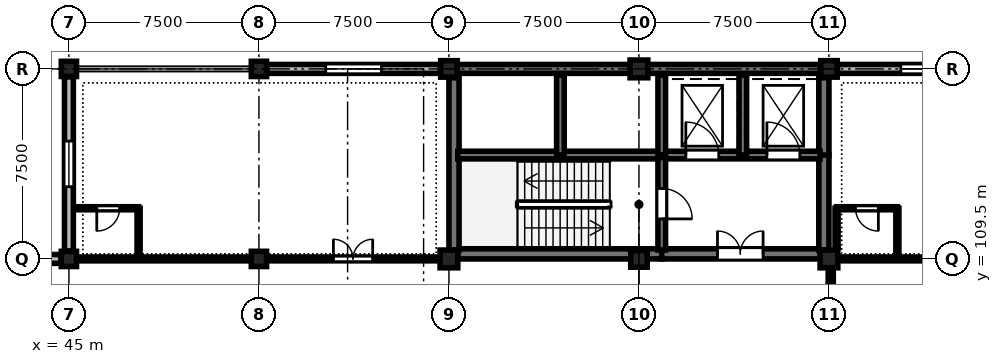
"""IFC4 building model, lengths in metres.
Left out: names, types, materials, properties, quantities, classifications, styles, units other than length and angle.
Written with IfcOpenShell. Run it as: python <this file> out.ifc"""

import sys

from ifc_helpers import new_model, si_unit, direction, frame, frame_2d, origin, origin_2d, place, context, subcontext, project, spatial, rectangle, circle, extrude, element, fill, save


model = new_model("IFC4")
c1 = context("Model", 3, precision=1e-05, world=origin(), true_north=direction((0.0, 1.0)))
c2 = subcontext(c1, "Body", "Model", "MODEL_VIEW")
j1 = project(units=[si_unit("LENGTHUNIT", "METRE"), si_unit("PLANEANGLEUNIT", "RADIAN")], contexts=[c1])
p1 = place(None, origin())
s1 = spatial("IfcSite", under=j1, at=p1, CompositionType="ELEMENT")
p2 = place(p1, origin())
s2 = spatial("IfcBuilding", under=s1, at=p2, CompositionType="ELEMENT")
p3 = place(p2, frame((0.0, 0.0, 9.3)))
s3 = spatial("IfcBuildingStorey", under=s2, at=p3, CompositionType="ELEMENT", Elevation=9.3)
p4 = place(p3, frame((45.0, 109.5, 0.0), z_axis=(0.0, 0.0, 1.0), x_axis=(1.0, 0.0, 0.0)))
e1 = element("IfcColumn", 1, at=p4, inside=s3, PredefinedType="COLUMN", context=c2, shape_type="SweptSolid", body=[
    extrude(rectangle(XDim=0.6, YDim=0.6, at=origin_2d()), origin(), (0.0, 0.0, 1.0), 4.8),
])
for number, where, z_axis, x_axis in (
    (2, (45.0, 117.0, 0.0), (0.0, 0.0, 1.0), (1.0, 0.0, 0.0)),
    (3, (52.5, 109.5, 0.0), (0.0, 0.0, 1.0), (1.0, 0.0, 0.0)),
):
    element("IfcColumn", number, at=place(p3, frame(where, z_axis=z_axis, x_axis=x_axis)), inside=s3, PredefinedType="COLUMN", context=c2, shape_type="SweptSolid", body=[
        extrude(circle(Radius=0.3, at=origin_2d()), origin(), (0.0, 0.0, 1.0), 4.8),
    ])
p5 = place(p3, frame((52.5, 117.0, 0.0), z_axis=(0.0, 0.0, 1.0), x_axis=(1.0, 0.0, 0.0)))
e4 = element("IfcColumn", 4, at=p5, inside=s3, PredefinedType="COLUMN", context=c2, shape_type="SweptSolid", body=[
    extrude(rectangle(XDim=0.6, YDim=0.6, at=origin_2d()), origin(), (0.0, 0.0, 1.0), 4.8),
])
p6 = place(p3, frame((60.0, 109.5, 0.0), z_axis=(0.0, 0.0, 1.0), x_axis=(1.0, 0.0, 0.0)))
e5 = element("IfcColumn", 5, at=p6, inside=s3, PredefinedType="COLUMN", context=c2, shape_type="SweptSolid", body=[
    extrude(rectangle(XDim=0.7, YDim=0.7, at=origin_2d()), origin(), (0.0, 0.0, 1.0), 4.8),
])
for number, where, z_axis, x_axis in (
    (6, (60.0, 117.0, 0.0), (0.0, 0.0, 1.0), (1.0, 0.0, 0.0)),
    (7, (67.5, 109.5, 0.0), (0.0, 0.0, 1.0), (1.0, 0.0, 0.0)),
):
    element("IfcColumn", number, at=place(p3, frame(where, z_axis=z_axis, x_axis=x_axis)), inside=s3, PredefinedType="COLUMN", context=c2, shape_type="SweptSolid", body=[
        extrude(rectangle(XDim=0.65, YDim=0.65, at=origin_2d()), origin(), (0.0, 0.0, 1.0), 4.8),
    ])
for number, where, z_axis, x_axis in (
    (8, (67.5, 117.0, 0.0), (0.0, 0.0, 1.0), (1.0, 0.0, 0.0)),
    (9, (75.0, 109.5, 0.0), (0.0, 0.0, 1.0), (1.0, 0.0, 0.0)),
):
    element("IfcColumn", number, at=place(p3, frame(where, z_axis=z_axis, x_axis=x_axis)), inside=s3, PredefinedType="COLUMN", context=c2, shape_type="SweptSolid", body=[
        extrude(rectangle(XDim=0.7, YDim=0.7, at=origin_2d()), origin(), (0.0, 0.0, 1.0), 4.8),
    ])
p7 = place(p3, frame((75.0, 117.0, 0.0), z_axis=(0.0, 0.0, 1.0), x_axis=(1.0, 0.0, 0.0)))
e10 = element("IfcColumn", 10, at=p7, inside=s3, PredefinedType="COLUMN", context=c2, shape_type="SweptSolid", body=[
    extrude(rectangle(XDim=0.65, YDim=0.65, at=origin_2d()), origin(), (0.0, 0.0, 1.0), 4.8),
])
p8 = place(p3, frame((37.81, 109.5, 0.0), z_axis=(0.0, 0.0, 1.0), x_axis=(1.0, 0.0, 0.0)))
e11 = element("IfcWall", 11, at=p8, inside=s3, PredefinedType="STANDARD", context=c2, shape_type="SweptSolid", body=[
    extrude(rectangle(XDim=6.88, YDim=0.35, at=frame_2d((3.44, 0.0))), origin(), (0.0, 0.0, 1.0), 3.95),
])
p9 = place(p8, frame((2.64, 0.0, 0.9)))
e12 = element("IfcOpeningElement", 12, at=p9, cuts=e11, PredefinedType="OPENING", context=c2, shape_type="SweptSolid", body=[
    extrude(rectangle(XDim=1.6, YDim=1.95, at=frame_2d((0.8, 0.975))), frame((0.0, 0.185, 0.0), z_axis=(0.0, -1.0, 0.0), x_axis=(1.0, 0.0, 0.0)), (0.0, 0.0, 1.0), 0.37),
])
p10 = place(p3, frame((45.0, 109.81, 0.0), z_axis=(0.0, 0.0, 1.0), x_axis=(0.0, 1.0, 0.0)))
e13 = element("IfcWall", 13, at=p10, inside=s3, PredefinedType="STANDARD", context=c2, shape_type="SweptSolid", body=[
    extrude(rectangle(XDim=6.88, YDim=0.35, at=frame_2d((3.44, 0.0))), origin(), (0.0, 0.0, 1.0), 3.95),
])
p11 = place(p10, frame((2.54, 0.0, 0.9)))
e14 = element("IfcOpeningElement", 14, at=p11, cuts=e13, PredefinedType="OPENING", context=c2, shape_type="SweptSolid", body=[
    extrude(rectangle(XDim=1.8, YDim=1.95, at=frame_2d((0.9, 0.975))), frame((0.0, 0.185, 0.0), z_axis=(0.0, -1.0, 0.0), x_axis=(1.0, 0.0, 0.0)), (0.0, 0.0, 1.0), 0.37),
])
p12 = place(p3, frame((52.81, 117.0, 0.0), z_axis=(0.0, 0.0, 1.0), x_axis=(1.0, 0.0, 0.0)))
e15 = element("IfcWall", 15, at=p12, inside=s3, PredefinedType="STANDARD", context=c2, shape_type="SweptSolid", body=[
    extrude(rectangle(XDim=6.855, YDim=0.35, at=frame_2d((3.427, 0.0))), origin(), (0.0, 0.0, 1.0), 3.95),
])
p13 = place(p12, frame((2.327, 0.0, 0.9)))
e16 = element("IfcOpeningElement", 16, at=p13, cuts=e15, PredefinedType="OPENING", context=c2, shape_type="SweptSolid", body=[
    extrude(rectangle(XDim=2.2, YDim=1.95, at=frame_2d((1.1, 0.975))), frame((0.0, 0.185, 0.0), z_axis=(0.0, -1.0, 0.0), x_axis=(1.0, 0.0, 0.0)), (0.0, 0.0, 1.0), 0.37),
])
for number, where, z_axis, x_axis in (
    (17, (60.335, 117.0, 0.0), (0.0, 0.0, 1.0), (1.0, 0.0, 0.0)),
    (18, (67.86, 117.0, 0.0), (0.0, 0.0, 1.0), (1.0, 0.0, 0.0)),
):
    element("IfcWall", number, at=place(p3, frame(where, z_axis=z_axis, x_axis=x_axis)), inside=s3, PredefinedType="SHEAR", context=c2, shape_type="SweptSolid", body=[
        extrude(rectangle(XDim=6.805, YDim=0.35, at=frame_2d((3.402, 0.0))), origin(), (0.0, 0.0, 1.0), 4.55),
    ])
p14 = place(p3, frame((75.335, 117.0, 0.0), z_axis=(0.0, 0.0, 1.0), x_axis=(1.0, 0.0, 0.0)))
e19 = element("IfcWall", 19, at=p14, inside=s3, PredefinedType="STANDARD", context=c2, shape_type="SweptSolid", body=[
    extrude(rectangle(XDim=6.805, YDim=0.35, at=frame_2d((3.402, 0.0))), origin(), (0.0, 0.0, 1.0), 3.95),
])
p15 = place(p14, frame((2.502, 0.0, 0.9)))
e20 = element("IfcOpeningElement", 20, at=p15, cuts=e19, PredefinedType="OPENING", context=c2, shape_type="SweptSolid", body=[
    extrude(rectangle(XDim=1.8, YDim=1.8, at=frame_2d((0.9, 0.9))), frame((0.0, 0.185, 0.0), z_axis=(0.0, -1.0, 0.0), x_axis=(1.0, 0.0, 0.0)), (0.0, 0.0, 1.0), 0.37),
])
p16 = place(p3, frame((60.35, 109.7, 0.0), z_axis=(0.0, 0.0, 1.0), x_axis=(1.0, 0.0, 0.0)))
e21 = element("IfcWall", 21, at=p16, inside=s3, PredefinedType="SHEAR", context=c2, shape_type="SweptSolid", body=[
    extrude(rectangle(XDim=8.05, YDim=0.4, at=frame_2d((4.025, 0.0))), origin(), (0.0, 0.0, 1.0), 4.55),
])
p17 = place(p3, frame((68.4, 109.7, 0.0), z_axis=(0.0, 0.0, 1.0), x_axis=(1.0, 0.0, 0.0)))
e22 = element("IfcWall", 22, at=p17, inside=s3, PredefinedType="SHEAR", context=c2, shape_type="SweptSolid", body=[
    extrude(rectangle(XDim=6.25, YDim=0.4, at=frame_2d((3.125, 0.0))), origin(), (0.0, 0.0, 1.0), 4.55),
])
p18 = place(p17, frame((2.2, 0.0, 0.0)))
e23 = element("IfcOpeningElement", 23, at=p18, cuts=e22, PredefinedType="OPENING", context=c2, shape_type="SweptSolid", body=[
    extrude(rectangle(XDim=1.8, YDim=2.25, at=frame_2d((0.9, 1.125))), frame((0.0, 0.21, 0.0), z_axis=(0.0, -1.0, 0.0), x_axis=(1.0, 0.0, 0.0)), (0.0, 0.0, 1.0), 0.42),
])
p19 = place(p3, frame((60.2, 109.85, 0.0), z_axis=(0.0, 0.0, 1.0), x_axis=(0.0, 1.0, 0.0)))
e24 = element("IfcWall", 24, at=p19, inside=s3, PredefinedType="SHEAR", context=c2, shape_type="SweptSolid", body=[
    extrude(rectangle(XDim=6.8, YDim=0.4, at=frame_2d((3.4, 0.0))), origin(), (0.0, 0.0, 1.0), 4.55),
])
p20 = place(p3, frame((74.8, 109.85, 0.0), z_axis=(0.0, 0.0, 1.0), x_axis=(0.0, 1.0, 0.0)))
e25 = element("IfcWall", 25, at=p20, inside=s3, PredefinedType="SHEAR", context=c2, shape_type="SweptSolid", body=[
    extrude(rectangle(XDim=3.75, YDim=0.4, at=frame_2d((1.875, 0.0))), origin(), (0.0, 0.0, 1.0), 4.55),
])
p21 = place(p3, frame((74.8, 113.6, 0.0), z_axis=(0.0, 0.0, 1.0), x_axis=(0.0, 1.0, 0.0)))
e26 = element("IfcWall", 26, at=p21, inside=s3, PredefinedType="SHEAR", context=c2, shape_type="SweptSolid", body=[
    extrude(rectangle(XDim=3.05, YDim=0.4, at=frame_2d((1.525, 0.0))), origin(), (0.0, 0.0, 1.0), 4.55),
])
p22 = place(p3, frame((60.35, 113.6, 0.0), z_axis=(0.0, 0.0, 1.0), x_axis=(1.0, 0.0, 0.0)))
e27 = element("IfcWall", 27, at=p22, inside=s3, PredefinedType="SHEAR", context=c2, shape_type="SweptSolid", body=[
    extrude(rectangle(XDim=8.05, YDim=0.3, at=frame_2d((4.025, 0.0))), origin(), (0.0, 0.0, 1.0), 4.55),
])
p23 = place(p3, frame((68.4, 113.6, 0.0), z_axis=(0.0, 0.0, 1.0), x_axis=(1.0, 0.0, 0.0)))
e28 = element("IfcWall", 28, at=p23, inside=s3, PredefinedType="SHEAR", context=c2, shape_type="SweptSolid", body=[
    extrude(rectangle(XDim=6.25, YDim=0.3, at=frame_2d((3.125, 0.0))), origin(), (0.0, 0.0, 1.0), 4.55),
])
p24 = place(p23, frame((0.95, 0.0, 0.0)))
e29 = element("IfcOpeningElement", 29, at=p24, cuts=e28, PredefinedType="OPENING", context=c2, shape_type="SweptSolid", body=[
    extrude(rectangle(XDim=1.3, YDim=2.2, at=frame_2d((0.65, 1.1))), frame((0.0, 0.16, 0.0), z_axis=(0.0, -1.0, 0.0), x_axis=(1.0, 0.0, 0.0)), (0.0, 0.0, 1.0), 0.32),
])
p25 = place(p23, frame((4.15, 0.0, 0.0)))
e30 = element("IfcOpeningElement", 30, at=p25, cuts=e28, PredefinedType="OPENING", context=c2, shape_type="SweptSolid", body=[
    extrude(rectangle(XDim=1.3, YDim=2.2, at=frame_2d((0.65, 1.1))), frame((0.0, 0.16, 0.0), z_axis=(0.0, -1.0, 0.0), x_axis=(1.0, 0.0, 0.0)), (0.0, 0.0, 1.0), 0.32),
])
p26 = place(p3, frame((68.4, 113.5, 0.0), z_axis=(0.0, 0.0, 1.0), x_axis=(0.0, -1.0, 0.0)))
e31 = element("IfcWall", 31, at=p26, inside=s3, PredefinedType="SHEAR", context=c2, shape_type="SweptSolid", body=[
    extrude(rectangle(XDim=3.65, YDim=0.3, at=frame_2d((1.825, 0.0))), origin(), (0.0, 0.0, 1.0), 4.55),
])
p27 = place(p26, frame((1.22, 0.0, 0.0)))
e32 = element("IfcOpeningElement", 32, at=p27, cuts=e31, PredefinedType="OPENING", context=c2, shape_type="SweptSolid", body=[
    extrude(rectangle(XDim=1.2, YDim=2.25, at=frame_2d((0.6, 1.125))), frame((0.0, 0.16, 0.0), z_axis=(0.0, -1.0, 0.0), x_axis=(1.0, 0.0, 0.0)), (0.0, 0.0, 1.0), 0.32),
])
for number, where, z_axis, x_axis in (
    (33, (64.4, 113.6, 0.0), (0.0, 0.0, 1.0), (0.0, 1.0, 0.0)),
    (34, (68.4, 113.6, 0.0), (0.0, 0.0, 1.0), (0.0, 1.0, 0.0)),
    (35, (71.6, 113.6, 0.0), (0.0, 0.0, 1.0), (0.0, 1.0, 0.0)),
):
    element("IfcWall", number, at=place(p3, frame(where, z_axis=z_axis, x_axis=x_axis)), inside=s3, PredefinedType="SHEAR", context=c2, shape_type="SweptSolid", body=[
        extrude(rectangle(XDim=3.15, YDim=0.3, at=frame_2d((1.575, 0.0))), origin(), (0.0, 0.0, 1.0), 4.55),
    ])
p28 = place(p3, frame((45.35, 109.5, 0.0), z_axis=(0.0, 0.0, 1.0), x_axis=(1.0, 0.0, 0.0)))
e36 = element("IfcWall", 36, at=p28, inside=s3, PredefinedType="PARTITIONING", context=c2, shape_type="SweptSolid", body=[
    extrude(rectangle(XDim=14.35, YDim=0.15, at=frame_2d((7.175, 0.0))), origin(), (0.0, 0.0, 1.0), 3.985),
])
p29 = place(p28, frame((10.09, 0.0, 0.0)))
e37 = element("IfcOpeningElement", 37, at=p29, cuts=e36, PredefinedType="OPENING", context=c2, shape_type="SweptSolid", body=[
    extrude(rectangle(XDim=1.55, YDim=2.35, at=frame_2d((0.775, 1.175))), frame((0.0, 0.085, 0.0), z_axis=(0.0, -1.0, 0.0), x_axis=(1.0, 0.0, 0.0)), (0.0, 0.0, 1.0), 0.17),
])
p30 = place(p3, frame((47.75, 111.5, 0.0), z_axis=(0.0, 0.0, 1.0), x_axis=(-1.0, 0.0, 0.0)))
e38 = element("IfcWall", 38, at=p30, inside=s3, PredefinedType="PARTITIONING", context=c2, shape_type="SweptSolid", body=[
    extrude(rectangle(XDim=2.4, YDim=0.12, at=frame_2d((1.2, 0.0))), origin(), (0.0, 0.0, 1.0), 4.535),
])
p31 = place(p30, frame((0.75, 0.0, 0.0)))
e39 = element("IfcOpeningElement", 39, at=p31, cuts=e38, PredefinedType="OPENING", context=c2, shape_type="SweptSolid", body=[
    extrude(rectangle(XDim=0.9, YDim=2.1, at=frame_2d((0.45, 1.05))), frame((0.0, 0.07, 0.0), z_axis=(0.0, -1.0, 0.0), x_axis=(1.0, 0.0, 0.0)), (0.0, 0.0, 1.0), 0.14),
])
p32 = place(p3, frame((47.75, 109.5, 0.0), z_axis=(0.0, 0.0, 1.0), x_axis=(0.0, 1.0, 0.0)))
e40 = element("IfcWall", 40, at=p32, inside=s3, PredefinedType="PARTITIONING", context=c2, shape_type="SweptSolid", body=[
    extrude(rectangle(XDim=2.0, YDim=0.12, at=frame_2d((1.0, 0.0))), origin(), (0.0, 0.0, 1.0), 4.535),
])
p33 = place(p3, frame((75.3, 109.5, 0.0), z_axis=(0.0, 0.0, 1.0), x_axis=(1.0, 0.0, 0.0)))
e41 = element("IfcWall", 41, at=p33, inside=s3, PredefinedType="PARTITIONING", context=c2, shape_type="SweptSolid", body=[
    extrude(rectangle(XDim=21.9, YDim=0.15, at=frame_2d((10.95, 0.0))), origin(), (0.0, 0.0, 1.0), 3.985),
])
p34 = place(p33, frame((10.175, 0.0, 0.0)))
e42 = element("IfcOpeningElement", 42, at=p34, cuts=e41, PredefinedType="OPENING", context=c2, shape_type="SweptSolid", body=[
    extrude(rectangle(XDim=1.55, YDim=2.35, at=frame_2d((0.775, 1.175))), frame((0.0, 0.085, 0.0), z_axis=(0.0, -1.0, 0.0), x_axis=(1.0, 0.0, 0.0)), (0.0, 0.0, 1.0), 0.17),
])
p35 = place(p3, frame((77.7, 111.5, 0.0), z_axis=(0.0, 0.0, 1.0), x_axis=(-1.0, 0.0, 0.0)))
e43 = element("IfcWall", 43, at=p35, inside=s3, PredefinedType="PARTITIONING", context=c2, shape_type="SweptSolid", body=[
    extrude(rectangle(XDim=2.4, YDim=0.12, at=frame_2d((1.2, 0.0))), origin(), (0.0, 0.0, 1.0), 4.535),
])
p36 = place(p35, frame((0.75, 0.0, 0.0)))
e44 = element("IfcOpeningElement", 44, at=p36, cuts=e43, PredefinedType="OPENING", context=c2, shape_type="SweptSolid", body=[
    extrude(rectangle(XDim=0.9, YDim=2.1, at=frame_2d((0.45, 1.05))), frame((0.0, 0.07, 0.0), z_axis=(0.0, -1.0, 0.0), x_axis=(1.0, 0.0, 0.0)), (0.0, 0.0, 1.0), 0.14),
])
p37 = place(p3, frame((77.7, 109.5, 0.0), z_axis=(0.0, 0.0, 1.0), x_axis=(0.0, 1.0, 0.0)))
e45 = element("IfcWall", 45, at=p37, inside=s3, PredefinedType="PARTITIONING", context=c2, shape_type="SweptSolid", body=[
    extrude(rectangle(XDim=2.0, YDim=0.12, at=frame_2d((1.0, 0.0))), origin(), (0.0, 0.0, 1.0), 4.535),
])
p38 = place(p3, frame((75.3, 109.95, 0.0), z_axis=(0.0, 0.0, 1.0), x_axis=(0.0, 1.0, 0.0)))
e46 = element("IfcWall", 46, at=p38, inside=s3, PredefinedType="PARTITIONING", context=c2, shape_type="SweptSolid", body=[
    extrude(rectangle(XDim=1.55, YDim=0.12, at=frame_2d((0.775, 0.0))), origin(), (0.0, 0.0, 1.0), 3.985),
])
p39 = place(p3, frame((75.07, 105.8, 0.0), z_axis=(0.0, 0.0, 1.0), x_axis=(0.0, 1.0, 0.0)))
e47 = element("IfcWall", 47, at=p39, inside=s3, PredefinedType="STANDARD", context=c2, shape_type="SweptSolid", body=[
    extrude(rectangle(XDim=3.3, YDim=0.2, at=frame_2d((1.65, 0.0))), origin(), (0.0, 0.0, 1.0), 3.835),
])
p40 = place(p39, frame((0.65, 0.0, 0.0)))
e48 = element("IfcOpeningElement", 48, at=p40, cuts=e47, PredefinedType="OPENING", context=c2, shape_type="SweptSolid", body=[
    extrude(rectangle(XDim=2.0, YDim=2.3, at=frame_2d((1.0, 1.15))), frame((0.0, 0.11, 0.0), z_axis=(0.0, -1.0, 0.0), x_axis=(1.0, 0.0, 0.0)), (0.0, 0.0, 1.0), 0.22),
])
p41 = place(p11, origin())
e49 = element("IfcWindow", 49, at=p41, inside=s3, PartitioningType="SINGLE_PANEL", PredefinedType="WINDOW", context=c2, shape_type="SweptSolid", body=[
    extrude(rectangle(XDim=1.8, YDim=1.95, at=frame_2d((0.9, 0.975))), frame((0.0, 0.03, 0.0), z_axis=(0.0, -1.0, 0.0), x_axis=(1.0, 0.0, 0.0)), (0.0, 0.0, 1.0), 0.06),
])
fill(e14, e49)
p42 = place(p13, origin())
e50 = element("IfcWindow", 50, at=p42, inside=s3, PartitioningType="SINGLE_PANEL", PredefinedType="WINDOW", context=c2, shape_type="SweptSolid", body=[
    extrude(rectangle(XDim=2.2, YDim=1.95, at=frame_2d((1.1, 0.975))), frame((0.0, 0.03, 0.0), z_axis=(0.0, -1.0, 0.0), x_axis=(1.0, 0.0, 0.0)), (0.0, 0.0, 1.0), 0.06),
])
fill(e16, e50)
p43 = place(p15, origin())
e51 = element("IfcWindow", 51, at=p43, inside=s3, PartitioningType="SINGLE_PANEL", PredefinedType="WINDOW", context=c2, shape_type="SweptSolid", body=[
    extrude(rectangle(XDim=1.8, YDim=1.8, at=frame_2d((0.9, 0.9))), frame((0.0, 0.03, 0.0), z_axis=(0.0, -1.0, 0.0), x_axis=(1.0, 0.0, 0.0)), (0.0, 0.0, 1.0), 0.06),
])
fill(e20, e51)
p44 = place(p18, origin())
e52 = element("IfcDoor", 52, at=p44, inside=s3, OperationType="DOUBLE_DOOR_SINGLE_SWING", PredefinedType="DOOR", context=c2, shape_type="SweptSolid", body=[
    extrude(rectangle(XDim=1.8, YDim=2.25, at=frame_2d((0.9, 1.125))), frame((0.0, 0.025, 0.0), z_axis=(0.0, -1.0, 0.0), x_axis=(1.0, 0.0, 0.0)), (0.0, 0.0, 1.0), 0.05),
])
fill(e23, e52)
p45 = place(p24, origin())
e53 = element("IfcDoor", 53, at=p45, inside=s3, OperationType="DOUBLE_DOOR_SLIDING", PredefinedType="DOOR", context=c2, shape_type="SweptSolid", body=[
    extrude(rectangle(XDim=1.3, YDim=2.2, at=frame_2d((0.65, 1.1))), frame((0.0, 0.025, 0.0), z_axis=(0.0, -1.0, 0.0), x_axis=(1.0, 0.0, 0.0)), (0.0, 0.0, 1.0), 0.05),
])
fill(e29, e53)
p46 = place(p25, origin())
e54 = element("IfcDoor", 54, at=p46, inside=s3, OperationType="DOUBLE_DOOR_SLIDING", PredefinedType="DOOR", context=c2, shape_type="SweptSolid", body=[
    extrude(rectangle(XDim=1.3, YDim=2.2, at=frame_2d((0.65, 1.1))), frame((0.0, 0.025, 0.0), z_axis=(0.0, -1.0, 0.0), x_axis=(1.0, 0.0, 0.0)), (0.0, 0.0, 1.0), 0.05),
])
fill(e30, e54)
p47 = place(p27, origin())
e55 = element("IfcDoor", 55, at=p47, inside=s3, OperationType="SINGLE_SWING_RIGHT", PredefinedType="DOOR", context=c2, shape_type="SweptSolid", body=[
    extrude(rectangle(XDim=1.2, YDim=2.25, at=frame_2d((0.6, 1.125))), frame((0.0, 0.025, 0.0), z_axis=(0.0, -1.0, 0.0), x_axis=(1.0, 0.0, 0.0)), (0.0, 0.0, 1.0), 0.05),
])
fill(e32, e55)
p48 = place(p29, origin())
e56 = element("IfcDoor", 56, at=p48, inside=s3, OperationType="DOUBLE_DOOR_SINGLE_SWING", PredefinedType="DOOR", context=c2, shape_type="SweptSolid", body=[
    extrude(rectangle(XDim=1.55, YDim=2.35, at=frame_2d((0.775, 1.175))), frame((0.0, 0.025, 0.0), z_axis=(0.0, -1.0, 0.0), x_axis=(1.0, 0.0, 0.0)), (0.0, 0.0, 1.0), 0.05),
])
fill(e37, e56)
p49 = place(p31, origin())
e57 = element("IfcDoor", 57, at=p49, inside=s3, OperationType="SINGLE_SWING_RIGHT", PredefinedType="DOOR", context=c2, shape_type="SweptSolid", body=[
    extrude(rectangle(XDim=0.9, YDim=2.1, at=frame_2d((0.45, 1.05))), frame((0.0, 0.025, 0.0), z_axis=(0.0, -1.0, 0.0), x_axis=(1.0, 0.0, 0.0)), (0.0, 0.0, 1.0), 0.05),
])
fill(e39, e57)
p50 = place(p36, origin())
e58 = element("IfcDoor", 58, at=p50, inside=s3, OperationType="SINGLE_SWING_LEFT", PredefinedType="DOOR", context=c2, shape_type="SweptSolid", body=[
    extrude(rectangle(XDim=0.9, YDim=2.1, at=frame_2d((0.45, 1.05))), frame((0.0, 0.025, 0.0), z_axis=(0.0, -1.0, 0.0), x_axis=(1.0, 0.0, 0.0)), (0.0, 0.0, 1.0), 0.05),
])
fill(e44, e58)
save(model, sys.argv[1])
